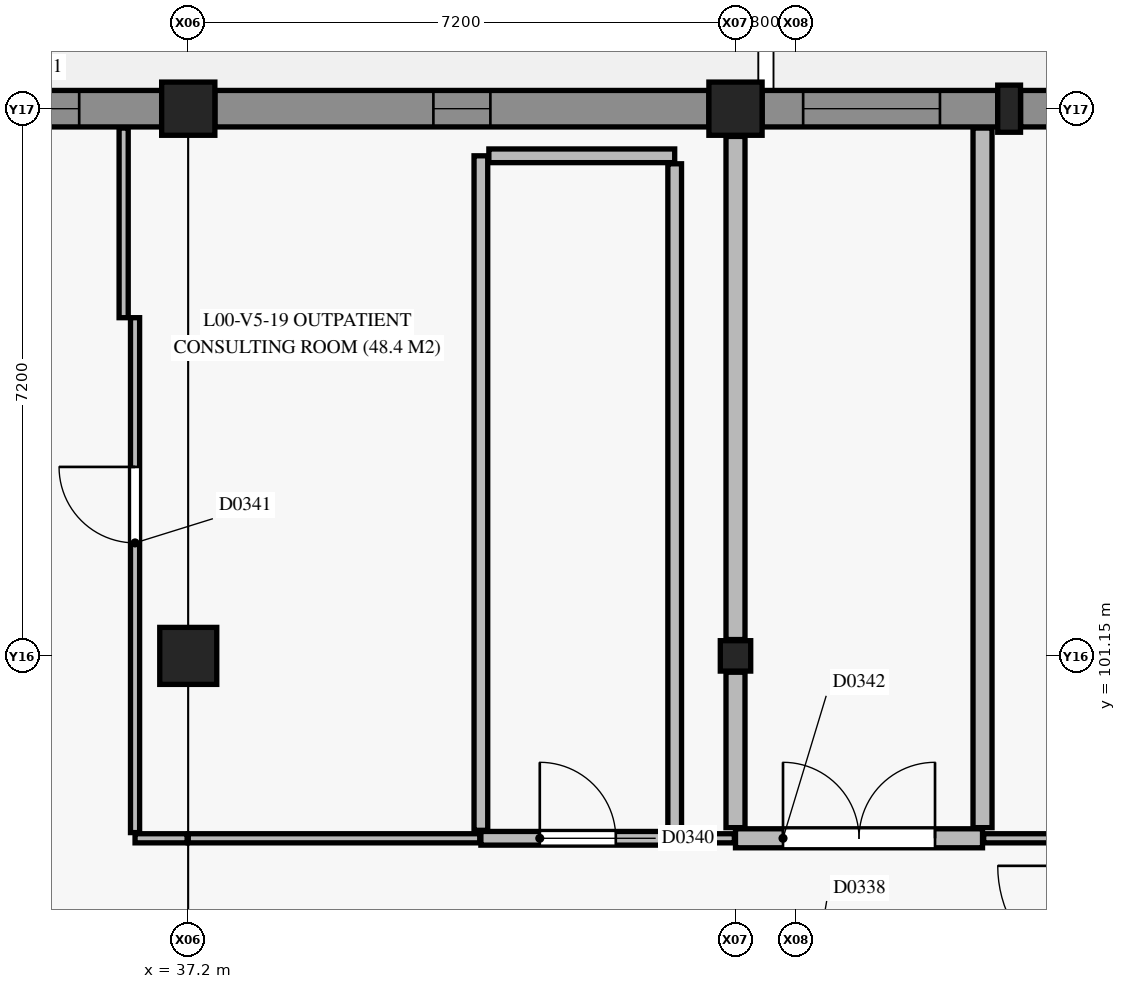
"""IFC4 building model, lengths in metres.
Left out: names, types, materials, properties, quantities, classifications, styles, units other than length and angle.
Written with IfcOpenShell. Run it as: python <this file> out.ifc"""

import sys

from ifc_helpers import new_model, si_unit, direction, frame, frame_2d, origin, origin_2d, place, context, subcontext, project, spatial, rectangle, circle, extrude, element, fill, save


model = new_model("IFC4")
c1 = context("Model", 3, precision=1e-05, world=origin(), true_north=direction((0.0, 1.0)))
c2 = subcontext(c1, "Body", "Model", "MODEL_VIEW")
j1 = project(units=[si_unit("LENGTHUNIT", "METRE"), si_unit("PLANEANGLEUNIT", "RADIAN")], contexts=[c1])
p1 = place(None, origin())
s1 = spatial("IfcSite", under=j1, at=p1, CompositionType="ELEMENT")
p2 = place(p1, origin())
s2 = spatial("IfcBuilding", under=s1, at=p2, CompositionType="ELEMENT")
p3 = place(p2, origin())
s3 = spatial("IfcBuildingStorey", under=s2, at=p3, CompositionType="ELEMENT", Elevation=0.0)
p4 = place(p3, frame((37.2, 101.15, 0.0), z_axis=(0.0, 0.0, 1.0), x_axis=(1.0, 0.0, 0.0)))
e1 = element("IfcColumn", 1, at=p4, inside=s3, PredefinedType="COLUMN", context=c2, shape_type="SweptSolid", body=[
    extrude(rectangle(XDim=0.75, YDim=0.75, at=origin_2d()), origin(), (0.0, 0.0, 1.0), 4.8),
])
p5 = place(p3, frame((37.2, 108.35, 0.0), z_axis=(0.0, 0.0, 1.0), x_axis=(1.0, 0.0, 0.0)))
e2 = element("IfcColumn", 2, at=p5, inside=s3, PredefinedType="COLUMN", context=c2, shape_type="SweptSolid", body=[
    extrude(rectangle(XDim=0.7, YDim=0.7, at=origin_2d()), origin(), (0.0, 0.0, 1.0), 4.8),
])
p6 = place(p3, frame((44.4, 101.15, 0.0), z_axis=(0.0, 0.0, 1.0), x_axis=(1.0, 0.0, 0.0)))
e3 = element("IfcColumn", 3, at=p6, inside=s3, PredefinedType="COLUMN", context=c2, shape_type="SweptSolid", body=[
    extrude(rectangle(XDim=0.4, YDim=0.4, at=origin_2d()), origin(), (0.0, 0.0, 1.0), 4.8),
])
p7 = place(p3, frame((44.4, 108.35, 0.0), z_axis=(0.0, 0.0, 1.0), x_axis=(1.0, 0.0, 0.0)))
e4 = element("IfcColumn", 4, at=p7, inside=s3, PredefinedType="COLUMN", context=c2, shape_type="SweptSolid", body=[
    extrude(circle(Radius=0.35, at=origin_2d()), origin(), (0.0, 0.0, 1.0), 4.8),
])
p8 = place(p3, frame((48.0, 108.35, 0.0), z_axis=(0.0, 0.0, 1.0), x_axis=(1.0, 0.0, 0.0)))
e5 = element("IfcColumn", 5, at=p8, inside=s3, PredefinedType="PILASTER", context=c2, shape_type="SweptSolid", body=[
    extrude(rectangle(XDim=0.3, YDim=0.62, at=origin_2d()), origin(), (0.0, 0.0, 1.0), 4.8),
])
p9 = place(p3, frame((34.0, 108.35, 0.0), z_axis=(0.0, 0.0, 1.0), x_axis=(1.0, 0.0, 0.0)))
e6 = element("IfcWall", 6, at=p9, inside=s3, PredefinedType="SOLIDWALL", context=c2, shape_type="SweptSolid", body=[
    extrude(rectangle(XDim=2.85, YDim=0.48, at=frame_2d((1.425, 0.0))), origin(), (0.0, 0.0, 1.0), 3.7),
])
p10 = place(p9, frame((0.565, 0.0, 0.9)))
e7 = element("IfcOpeningElement", 7, at=p10, cuts=e6, PredefinedType="OPENING", context=c2, shape_type="SweptSolid", body=[
    extrude(rectangle(XDim=1.2, YDim=1.5, at=frame_2d((0.6, 0.75))), frame((0.0, 0.25, 0.0), z_axis=(0.0, -1.0, 0.0), x_axis=(1.0, 0.0, 0.0)), (0.0, 0.0, 1.0), 0.5),
])
p11 = place(p3, frame((37.55, 108.35, 0.0), z_axis=(0.0, 0.0, 1.0), x_axis=(1.0, 0.0, 0.0)))
e8 = element("IfcWall", 8, at=p11, inside=s3, PredefinedType="SOLIDWALL", context=c2, shape_type="SweptSolid", body=[
    extrude(rectangle(XDim=6.5, YDim=0.48, at=frame_2d((3.25, 0.0))), origin(), (0.0, 0.0, 1.0), 3.7),
])
p12 = place(p11, frame((2.875, 0.0, 0.9)))
e9 = element("IfcOpeningElement", 9, at=p12, cuts=e8, PredefinedType="OPENING", context=c2, shape_type="SweptSolid", body=[
    extrude(rectangle(XDim=0.75, YDim=1.8, at=frame_2d((0.375, 0.9))), frame((0.0, 0.25, 0.0), z_axis=(0.0, -1.0, 0.0), x_axis=(1.0, 0.0, 0.0)), (0.0, 0.0, 1.0), 0.5),
])
p13 = place(p3, frame((44.75, 108.35, 0.0), z_axis=(0.0, 0.0, 1.0), x_axis=(1.0, 0.0, 0.0)))
e10 = element("IfcWall", 10, at=p13, inside=s3, PredefinedType="SOLIDWALL", context=c2, shape_type="SweptSolid", body=[
    extrude(rectangle(XDim=3.1, YDim=0.48, at=frame_2d((1.55, 0.0))), origin(), (0.0, 0.0, 1.0), 3.7),
])
p14 = place(p13, frame((0.54, 0.0, 0.9)))
e11 = element("IfcOpeningElement", 11, at=p14, cuts=e10, PredefinedType="OPENING", context=c2, shape_type="SweptSolid", body=[
    extrude(rectangle(XDim=1.8, YDim=1.5, at=frame_2d((0.9, 0.75))), frame((0.0, 0.25, 0.0), z_axis=(0.0, -1.0, 0.0), x_axis=(1.0, 0.0, 0.0)), (0.0, 0.0, 1.0), 0.5),
])
p15 = place(p3, frame((48.15, 108.35, 0.0), z_axis=(0.0, 0.0, 1.0), x_axis=(1.0, 0.0, 0.0)))
e12 = element("IfcWall", 12, at=p15, inside=s3, PredefinedType="SOLIDWALL", context=c2, shape_type="SweptSolid", body=[
    extrude(rectangle(XDim=3.15, YDim=0.48, at=frame_2d((1.575, 0.0))), origin(), (0.0, 0.0, 1.0), 3.7),
])
p16 = place(p15, frame((0.975, 0.0, 0.6)))
e13 = element("IfcOpeningElement", 13, at=p16, cuts=e12, PredefinedType="OPENING", context=c2, shape_type="SweptSolid", body=[
    extrude(rectangle(XDim=1.2, YDim=2.2, at=frame_2d((0.6, 1.1))), frame((0.0, 0.25, 0.0), z_axis=(0.0, -1.0, 0.0), x_axis=(1.0, 0.0, 0.0)), (0.0, 0.0, 1.0), 0.5),
])
p17 = place(p3, frame((41.05, 98.75, 0.0), z_axis=(0.0, 0.0, 1.0), x_axis=(1.0, 0.0, 0.0)))
e14 = element("IfcWall", 14, at=p17, inside=s3, PredefinedType="PLUMBINGWALL", context=c2, shape_type="SweptSolid", body=[
    extrude(rectangle(XDim=2.55, YDim=0.18, at=frame_2d((1.275, 0.0))), origin(), (0.0, 0.0, 1.0), 4.045),
])
p18 = place(p17, frame((0.775, 0.0, 0.0)))
e15 = element("IfcOpeningElement", 15, at=p18, cuts=e14, PredefinedType="OPENING", context=c2, shape_type="SweptSolid", body=[
    extrude(rectangle(XDim=1.0, YDim=2.15, at=frame_2d((0.5, 1.075))), frame((0.0, 0.1, 0.0), z_axis=(0.0, -1.0, 0.0), x_axis=(1.0, 0.0, 0.0)), (0.0, 0.0, 1.0), 0.2),
])
p19 = place(p3, frame((41.05, 98.855, 0.0), z_axis=(0.0, 0.0, 1.0), x_axis=(0.0, 1.0, 0.0)))
e16 = element("IfcWall", 16, at=p19, inside=s3, PredefinedType="PLUMBINGWALL", context=c2, shape_type="SweptSolid", body=[
    extrude(rectangle(XDim=8.875, YDim=0.18, at=frame_2d((4.438, 0.0))), origin(), (0.0, 0.0, 1.0), 3.955),
])
p20 = place(p3, frame((41.155, 107.73, 0.0), z_axis=(0.0, 0.0, 1.0), x_axis=(1.0, 0.0, 0.0)))
e17 = element("IfcWall", 17, at=p20, inside=s3, PredefinedType="PLUMBINGWALL", context=c2, shape_type="SweptSolid", body=[
    extrude(rectangle(XDim=2.445, YDim=0.18, at=frame_2d((1.223, 0.0))), origin(), (0.0, 0.0, 1.0), 4.52),
])
p21 = place(p3, frame((43.6, 98.855, 0.0), z_axis=(0.0, 0.0, 1.0), x_axis=(0.0, 1.0, 0.0)))
e18 = element("IfcWall", 18, at=p21, inside=s3, PredefinedType="PLUMBINGWALL", context=c2, shape_type="SweptSolid", body=[
    extrude(rectangle(XDim=8.77, YDim=0.18, at=frame_2d((4.385, 0.0))), origin(), (0.0, 0.0, 1.0), 3.955),
])
p22 = place(p3, frame((44.4, 98.75, 0.0), z_axis=(0.0, 0.0, 1.0), x_axis=(1.0, 0.0, 0.0)))
e19 = element("IfcWall", 19, at=p22, inside=s3, PredefinedType="PARTITIONING", context=c2, shape_type="SweptSolid", body=[
    extrude(rectangle(XDim=3.25, YDim=0.25, at=frame_2d((1.625, 0.0))), origin(), (0.0, 0.0, 1.0), 3.955),
])
p23 = place(p22, frame((0.625, 0.0, 0.0)))
e20 = element("IfcOpeningElement", 20, at=p23, cuts=e19, PredefinedType="OPENING", context=c2, shape_type="SweptSolid", body=[
    extrude(rectangle(XDim=2.0, YDim=2.4, at=frame_2d((1.0, 1.2))), frame((0.0, 0.135, 0.0), z_axis=(0.0, -1.0, 0.0), x_axis=(1.0, 0.0, 0.0)), (0.0, 0.0, 1.0), 0.27),
])
p24 = place(p3, frame((47.665, 98.75, 0.0), z_axis=(0.0, 0.0, 1.0), x_axis=(1.0, 0.0, 0.0)))
e21 = element("IfcWall", 21, at=p24, inside=s3, PredefinedType="PARTITIONING", context=c2, shape_type="SweptSolid", body=[
    extrude(rectangle(XDim=1.71, YDim=0.12, at=frame_2d((0.855, 0.0))), origin(), (0.0, 0.0, 1.0), 4.085),
])
p25 = place(p3, frame((36.35, 105.6, 0.0), z_axis=(0.0, 0.0, 1.0), x_axis=(0.0, 1.0, 0.0)))
e22 = element("IfcWall", 22, at=p25, inside=s3, PredefinedType="PARTITIONING", context=c2, shape_type="SweptSolid", body=[
    extrude(rectangle(XDim=2.495, YDim=0.12, at=frame_2d((1.248, 0.0))), origin(), (0.0, 0.0, 1.0), 4.52),
])
p26 = place(p3, frame((43.615, 98.75, 0.0), z_axis=(0.0, 0.0, 1.0), x_axis=(1.0, 0.0, 0.0)))
e23 = element("IfcWall", 23, at=p26, inside=s3, PredefinedType="PARTITIONING", context=c2, shape_type="SweptSolid", body=[
    extrude(rectangle(XDim=0.77, YDim=0.12, at=frame_2d((0.385, 0.0))), origin(), (0.0, 0.0, 1.0), 3.955),
])
p27 = place(p3, frame((37.2, 98.75, 0.0), z_axis=(0.0, 0.0, 1.0), x_axis=(1.0, 0.0, 0.0)))
e24 = element("IfcWall", 24, at=p27, inside=s3, PredefinedType="PARTITIONING", context=c2, shape_type="SweptSolid", body=[
    extrude(rectangle(XDim=3.835, YDim=0.12, at=frame_2d((1.917, 0.0))), origin(), (0.0, 0.0, 1.0), 3.805),
])
p28 = place(p3, frame((36.5, 98.75, 0.0), z_axis=(0.0, 0.0, 1.0), x_axis=(1.0, 0.0, 0.0)))
e25 = element("IfcWall", 25, at=p28, inside=s3, PredefinedType="PARTITIONING", context=c2, shape_type="SweptSolid", body=[
    extrude(rectangle(XDim=0.685, YDim=0.12, at=frame_2d((0.343, 0.0))), origin(), (0.0, 0.0, 1.0), 3.805),
])
p29 = place(p3, frame((36.5, 98.825, 0.0), z_axis=(0.0, 0.0, 1.0), x_axis=(0.0, 1.0, 0.0)))
e26 = element("IfcWall", 26, at=p29, inside=s3, PredefinedType="PARTITIONING", context=c2, shape_type="SweptSolid", body=[
    extrude(rectangle(XDim=6.775, YDim=0.12, at=frame_2d((3.388, 0.0))), origin(), (0.0, 0.0, 1.0), 4.52),
])
p30 = place(p29, frame((3.812, 0.0, 0.0)))
e27 = element("IfcOpeningElement", 27, at=p30, cuts=e26, PredefinedType="OPENING", context=c2, shape_type="SweptSolid", body=[
    extrude(rectangle(XDim=1.0, YDim=2.15, at=frame_2d((0.5, 1.075))), frame((0.0, 0.07, 0.0), z_axis=(0.0, -1.0, 0.0), x_axis=(1.0, 0.0, 0.0)), (0.0, 0.0, 1.0), 0.14),
])
p31 = place(p3, frame((47.65, 98.89, 0.0), z_axis=(0.0, 0.0, 1.0), x_axis=(0.0, 1.0, 0.0)))
e28 = element("IfcWall", 28, at=p31, inside=s3, PredefinedType="PARTITIONING", context=c2, shape_type="SweptSolid", body=[
    extrude(rectangle(XDim=9.205, YDim=0.25, at=frame_2d((4.603, 0.0))), origin(), (0.0, 0.0, 1.0), 3.705),
])
p32 = place(p3, frame((44.4, 98.89, 0.0), z_axis=(0.0, 0.0, 1.0), x_axis=(0.0, 1.0, 0.0)))
e29 = element("IfcWall", 29, at=p32, inside=s3, PredefinedType="PARTITIONING", context=c2, shape_type="SweptSolid", body=[
    extrude(rectangle(XDim=2.045, YDim=0.25, at=frame_2d((1.022, 0.0))), origin(), (0.0, 0.0, 1.0), 3.955),
])
p33 = place(p3, frame((44.4, 101.365, 0.0), z_axis=(0.0, 0.0, 1.0), x_axis=(0.0, 1.0, 0.0)))
e30 = element("IfcWall", 30, at=p33, inside=s3, PredefinedType="PARTITIONING", context=c2, shape_type="SweptSolid", body=[
    extrude(rectangle(XDim=6.62, YDim=0.25, at=frame_2d((3.31, 0.0))), origin(), (0.0, 0.0, 1.0), 3.705),
])
p34 = place(p10, origin())
e31 = element("IfcWindow", 31, at=p34, inside=s3, PartitioningType="SINGLE_PANEL", PredefinedType="WINDOW", context=c2, shape_type="SweptSolid", body=[
    extrude(rectangle(XDim=1.2, YDim=1.5, at=frame_2d((0.6, 0.75))), frame((0.0, 0.03, 0.0), z_axis=(0.0, -1.0, 0.0), x_axis=(1.0, 0.0, 0.0)), (0.0, 0.0, 1.0), 0.06),
])
fill(e7, e31)
p35 = place(p12, origin())
e32 = element("IfcWindow", 32, at=p35, inside=s3, PartitioningType="SINGLE_PANEL", PredefinedType="WINDOW", context=c2, shape_type="SweptSolid", body=[
    extrude(rectangle(XDim=0.75, YDim=1.8, at=frame_2d((0.375, 0.9))), frame((0.0, 0.03, 0.0), z_axis=(0.0, -1.0, 0.0), x_axis=(1.0, 0.0, 0.0)), (0.0, 0.0, 1.0), 0.06),
])
fill(e9, e32)
p36 = place(p14, origin())
e33 = element("IfcWindow", 33, at=p36, inside=s3, PartitioningType="SINGLE_PANEL", PredefinedType="WINDOW", context=c2, shape_type="SweptSolid", body=[
    extrude(rectangle(XDim=1.8, YDim=1.5, at=frame_2d((0.9, 0.75))), frame((0.0, 0.03, 0.0), z_axis=(0.0, -1.0, 0.0), x_axis=(1.0, 0.0, 0.0)), (0.0, 0.0, 1.0), 0.06),
])
fill(e11, e33)
p37 = place(p18, origin())
e34 = element("IfcDoor", 34, at=p37, inside=s3, OperationType="SINGLE_SWING_LEFT", PredefinedType="DOOR", context=c2, shape_type="SweptSolid", body=[
    extrude(rectangle(XDim=1.0, YDim=2.15, at=frame_2d((0.5, 1.075))), frame((0.0, 0.025, 0.0), z_axis=(0.0, -1.0, 0.0), x_axis=(1.0, 0.0, 0.0)), (0.0, 0.0, 1.0), 0.05),
])
fill(e15, e34)
p38 = place(p30, origin())
e35 = element("IfcDoor", 35, at=p38, inside=s3, OperationType="SINGLE_SWING_RIGHT", PredefinedType="DOOR", context=c2, shape_type="SweptSolid", body=[
    extrude(rectangle(XDim=1.0, YDim=2.15, at=frame_2d((0.5, 1.075))), frame((0.0, 0.025, 0.0), z_axis=(0.0, -1.0, 0.0), x_axis=(1.0, 0.0, 0.0)), (0.0, 0.0, 1.0), 0.05),
])
fill(e27, e35)
p39 = place(p23, origin())
e36 = element("IfcDoor", 36, at=p39, inside=s3, OperationType="DOUBLE_DOOR_SINGLE_SWING", PredefinedType="DOOR", context=c2, shape_type="SweptSolid", body=[
    extrude(rectangle(XDim=2.0, YDim=2.4, at=frame_2d((1.0, 1.2))), frame((0.0, 0.025, 0.0), z_axis=(0.0, -1.0, 0.0), x_axis=(1.0, 0.0, 0.0)), (0.0, 0.0, 1.0), 0.05),
])
fill(e20, e36)
save(model, sys.argv[1])
